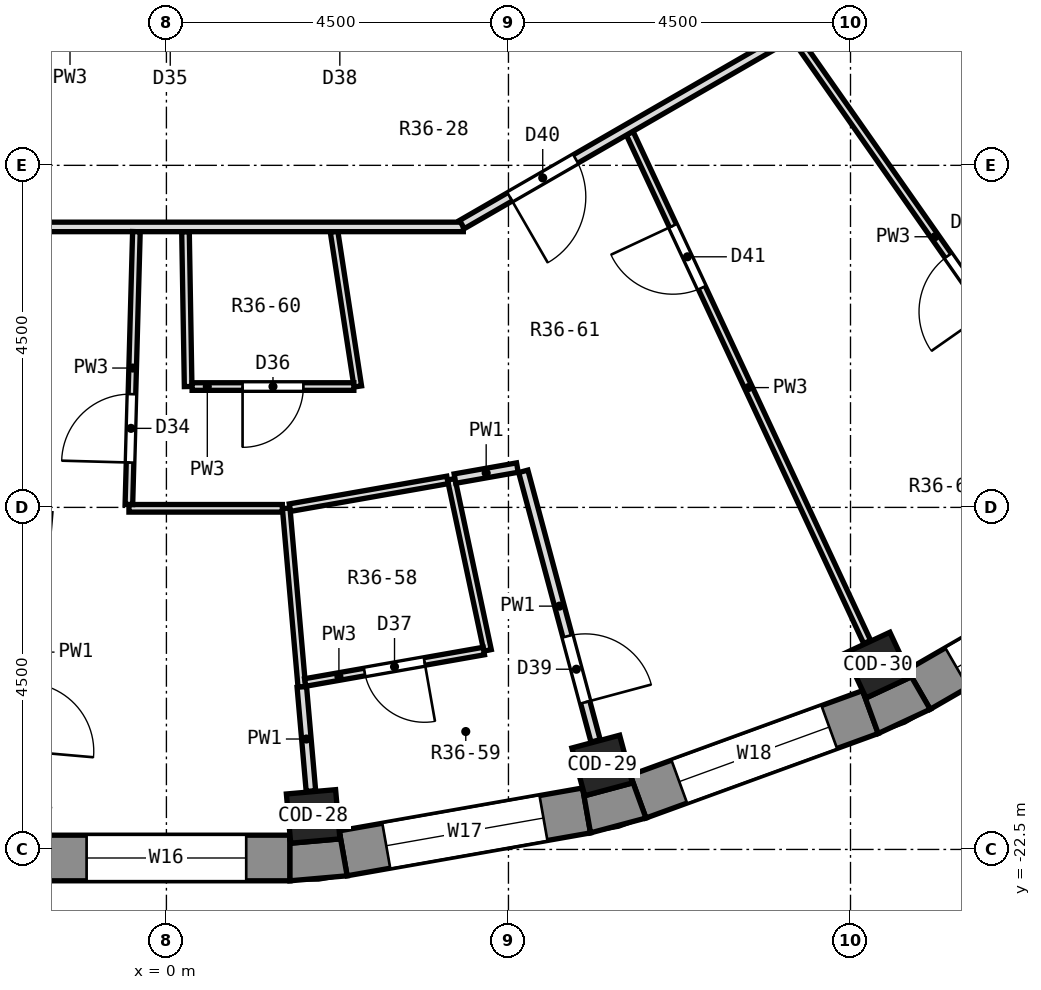
"""IFC4 building model, lengths in metres.
Left out: names, types, materials, properties, quantities, classifications, styles, units other than length and angle.
Written with IfcOpenShell. Run it as: python <this file> out.ifc"""

import sys

from ifc_helpers import new_model, si_unit, direction, frame, frame_2d, origin, origin_2d, place, context, subcontext, project, spatial, polyline, rectangle, outline, extrude, element, fill, save


model = new_model("IFC4")
c1 = context("Model", 3, precision=1e-05, world=origin(), true_north=direction((0.0, 1.0)))
c2 = subcontext(c1, "Body", "Model", "MODEL_VIEW")
j1 = project(units=[si_unit("LENGTHUNIT", "METRE"), si_unit("PLANEANGLEUNIT", "RADIAN")], contexts=[c1])
p1 = place(None, origin())
s1 = spatial("IfcSite", under=j1, at=p1, CompositionType="ELEMENT")
p2 = place(p1, origin())
s2 = spatial("IfcBuilding", under=s1, at=p2, CompositionType="ELEMENT")
p3 = place(p2, frame((0.0, 0.0, 259.4)))
s3 = spatial("IfcBuildingStorey", under=s2, at=p3, CompositionType="ELEMENT", Elevation=259.4)
for number, where, z_axis, x_axis in (
    (1, (1.93, -22.066, 0.0), (0.0, 0.0, 1.0), (0.087, -0.996, 0.0)),
    (2, (5.733, -21.395, 0.0), (0.0, 0.0, 1.0), (0.259, -0.966, 0.0)),
    (3, (9.361, -20.075, 0.0), (0.0, 0.0, 1.0), (0.423, -0.906, 0.0)),
):
    element("IfcColumn", number, at=place(p3, frame(where, z_axis=z_axis, x_axis=x_axis)), inside=s3, PredefinedType="COLUMN", context=c2, shape_type="SweptSolid", body=[
        extrude(rectangle(XDim=0.65, YDim=0.65, at=origin_2d()), origin(), (0.0, 0.0, 1.0), 3.3),
    ])
p4 = place(p3, frame((-1.626, -22.613, 0.0), z_axis=(0.0, 0.0, 1.0), x_axis=(1.0, 0.0, 0.0)))
e4 = element("IfcWall", 4, at=p4, inside=s3, PredefinedType="SOLIDWALL", context=c2, shape_type="SweptSolid", body=[
    extrude(rectangle(XDim=3.251, YDim=0.6, at=frame_2d((1.626, 0.0))), origin(), (0.0, 0.0, 1.0), 2.9),
])
p5 = place(p4, frame((0.576, 0.0, 0.9)))
e5 = element("IfcOpeningElement", 5, at=p5, cuts=e4, PredefinedType="OPENING", context=c2, shape_type="SweptSolid", body=[
    extrude(rectangle(XDim=2.1, YDim=1.8, at=frame_2d((1.05, 0.9))), frame((0.0, 0.312, 0.0), z_axis=(0.0, -1.0, 0.0), x_axis=(1.0, 0.0, 0.0)), (0.0, 0.0, 1.0), 0.624),
])
p6 = place(p3, frame((2.325, -22.551, 0.0), z_axis=(0.0, 0.0, 1.0), x_axis=(0.984806225186, 0.173656842178, 0.0)))
e6 = element("IfcWall", 6, at=p6, inside=s3, PredefinedType="SOLIDWALL", context=c2, shape_type="SweptSolid", body=[
    extrude(rectangle(XDim=3.252, YDim=0.6, at=frame_2d((1.626, 0.0))), origin(), (0.0, 0.0, 1.0), 2.9),
])
p7 = place(p6, frame((0.576, 0.0, 0.9)))
e7 = element("IfcOpeningElement", 7, at=p7, cuts=e6, PredefinedType="OPENING", context=c2, shape_type="SweptSolid", body=[
    extrude(rectangle(XDim=2.1, YDim=1.8, at=frame_2d((1.05, 0.9))), frame((0.0, 0.312, 0.0), z_axis=(0.0, -1.0, 0.0), x_axis=(1.0, 0.0, 0.0)), (0.0, 0.0, 1.0), 0.624),
])
p8 = place(p3, frame((6.206, -21.805, 0.0), z_axis=(0.0, 0.0, 1.0), x_axis=(0.939679383794, 0.342056509473, 0.0)))
e8 = element("IfcWall", 8, at=p8, inside=s3, PredefinedType="SOLIDWALL", context=c2, shape_type="SweptSolid", body=[
    extrude(rectangle(XDim=3.252, YDim=0.6, at=frame_2d((1.626, 0.0))), origin(), (0.0, 0.0, 1.0), 2.9),
])
p9 = place(p8, frame((0.576, 0.0, 0.9)))
e9 = element("IfcOpeningElement", 9, at=p9, cuts=e8, PredefinedType="OPENING", context=c2, shape_type="SweptSolid", body=[
    extrude(rectangle(XDim=2.1, YDim=1.8, at=frame_2d((1.05, 0.9))), frame((0.0, 0.312, 0.0), z_axis=(0.0, -1.0, 0.0), x_axis=(1.0, 0.0, 0.0)), (0.0, 0.0, 1.0), 0.624),
])
p10 = place(p3, frame((9.898, -20.396, 0.0), z_axis=(0.0, 0.0, 1.0), x_axis=(0.866016800201, 0.500014901547, 0.0)))
e10 = element("IfcWall", 10, at=p10, inside=s3, PredefinedType="SOLIDWALL", context=c2, shape_type="SweptSolid", body=[
    extrude(rectangle(XDim=3.252, YDim=0.6, at=frame_2d((1.626, 0.0))), origin(), (0.0, 0.0, 1.0), 2.9),
])
p11 = place(p10, frame((0.576, 0.0, 0.9)))
e11 = element("IfcOpeningElement", 11, at=p11, cuts=e10, PredefinedType="OPENING", context=c2, shape_type="SweptSolid", body=[
    extrude(rectangle(XDim=2.1, YDim=1.8, at=frame_2d((1.05, 0.9))), frame((0.0, 0.312, 0.0), z_axis=(0.0, -1.0, 0.0), x_axis=(1.0, 0.0, 0.0)), (0.0, 0.0, 1.0), 0.624),
])
p12 = place(p3, origin())
e12 = element("IfcWall", 12, at=p12, inside=s3, PredefinedType="SOLIDWALL", context=c2, shape_type="SweptSolid", body=[
    extrude(outline(polyline([(1.626, -22.913), (2.378, -22.847), (2.273, -22.256), (2.283, -22.361), (1.635, -22.418), (1.626, -22.312), (1.626, -22.913)])), origin(), (0.0, 0.0, 1.0), 2.9),
])
p13 = place(p3, origin())
e13 = element("IfcWall", 13, at=p13, inside=s3, PredefinedType="SOLIDWALL", context=c2, shape_type="SweptSolid", body=[
    extrude(outline(polyline([(6.309, -22.087), (6.104, -21.523), (6.131, -21.625), (5.503, -21.793), (5.476, -21.691), (5.58, -22.282), (6.309, -22.087)])), origin(), (0.0, 0.0, 1.0), 2.9),
])
p14 = place(p3, origin())
e14 = element("IfcWall", 14, at=p14, inside=s3, PredefinedType="SOLIDWALL", context=c2, shape_type="SweptSolid", body=[
    extrude(outline(polyline([(9.364, -20.975), (10.048, -20.656), (9.748, -20.136), (9.793, -20.232), (9.204, -20.507), (9.159, -20.411), (9.364, -20.975)])), origin(), (0.0, 0.0, 1.0), 2.9),
])
p15 = place(p3, frame((0.251, -14.373, 0.0), z_axis=(0.0, 0.0, 1.0), x_axis=(0.017133494207, -0.999853210915, 0.0)))
e15 = element("IfcWall", 15, at=p15, inside=s3, PredefinedType="PARTITIONING", context=c2, shape_type="SweptSolid", body=[
    extrude(rectangle(XDim=2.038, YDim=0.1, at=frame_2d((1.019, 0.0))), origin(), (0.0, 0.0, 1.0), 2.9),
])
p16 = place(p3, frame((1.576, -18.012, 0.0), z_axis=(0.0, 0.0, 1.0), x_axis=(0.087044975162, -0.996204382795, 0.0)))
e16 = element("IfcWall", 16, at=p16, inside=s3, PredefinedType="PARTITIONING", context=c2, shape_type="SweptSolid", body=[
    extrude(rectangle(XDim=2.359, YDim=0.1, at=frame_2d((1.179, 0.0))), origin(), (0.0, 0.0, 1.0), 2.9),
])
p17 = place(p3, frame((1.781, -20.362, 0.0), z_axis=(0.0, 0.0, 1.0), x_axis=(0.08715814214, -0.996194488169, 0.0)))
e17 = element("IfcWall", 17, at=p17, inside=s3, PredefinedType="PARTITIONING", context=c2, shape_type="SweptSolid", body=[
    extrude(rectangle(XDim=1.375, YDim=0.125, at=frame_2d((0.688, 0.0))), origin(), (0.0, 0.0, 1.0), 2.9),
])
p18 = place(p3, frame((2.206, -14.372, 0.0), z_axis=(0.0, 0.0, 1.0), x_axis=(0.151514148926, -0.988455088851, 0.0)))
e18 = element("IfcWall", 18, at=p18, inside=s3, PredefinedType="PARTITIONING", context=c2, shape_type="SweptSolid", body=[
    extrude(rectangle(XDim=2.061, YDim=0.1, at=frame_2d((1.03, 0.0))), origin(), (0.0, 0.0, 1.0), 2.9),
])
p19 = place(p3, frame((3.747, -17.63, 0.0), z_axis=(0.0, 0.0, 1.0), x_axis=(0.207710310325, -0.978190383813, 0.0)))
e19 = element("IfcWall", 19, at=p19, inside=s3, PredefinedType="PARTITIONING", context=c2, shape_type="SweptSolid", body=[
    extrude(rectangle(XDim=2.302, YDim=0.1, at=frame_2d((1.151, 0.0))), origin(), (0.0, 0.0, 1.0), 2.9),
])
p20 = place(p3, frame((4.695, -17.526, 0.0), z_axis=(0.0, 0.0, 1.0), x_axis=(0.259210267256, -0.965820913705, 0.0)))
e20 = element("IfcWall", 20, at=p20, inside=s3, PredefinedType="PARTITIONING", context=c2, shape_type="SweptSolid", body=[
    extrude(rectangle(XDim=3.671, YDim=0.125, at=frame_2d((1.836, 0.0))), origin(), (0.0, 0.0, 1.0), 2.9),
])
p21 = place(p20, frame((2.246, 0.0, 0.0)))
e21 = element("IfcOpeningElement", 21, at=p21, cuts=e20, PredefinedType="OPENING", context=c2, shape_type="SweptSolid", body=[
    extrude(rectangle(XDim=0.9, YDim=2.1, at=frame_2d((0.45, 1.05))), frame((0.0, 0.074, 0.0), z_axis=(0.0, -1.0, 0.0), x_axis=(1.0, 0.0, 0.0)), (0.0, 0.0, 1.0), 0.149),
])
p22 = place(p3, frame((6.095, -13.077, 0.0), z_axis=(0.0, 0.0, 1.0), x_axis=(0.422939739386, -0.906157810124, 0.0)))
e22 = element("IfcWall", 22, at=p22, inside=s3, PredefinedType="PARTITIONING", context=c2, shape_type="SweptSolid", body=[
    extrude(rectangle(XDim=7.388, YDim=0.1, at=frame_2d((3.694, 0.0))), origin(), (0.0, 0.0, 1.0), 2.9),
])
p23 = place(p22, frame((1.345, 0.0, 0.0)))
e23 = element("IfcOpeningElement", 23, at=p23, cuts=e22, PredefinedType="OPENING", context=c2, shape_type="SweptSolid", body=[
    extrude(rectangle(XDim=0.9, YDim=2.1, at=frame_2d((0.45, 1.05))), frame((0.0, 0.062, 0.0), z_axis=(0.0, -1.0, 0.0), x_axis=(1.0, 0.0, 0.0)), (0.0, 0.0, 1.0), 0.124),
])
p24 = place(p3, frame((8.275, -11.818, 0.0), z_axis=(0.0, 0.0, 1.0), x_axis=(0.573597629831, -0.819137204046, 0.0)))
e24 = element("IfcWall", 24, at=p24, inside=s3, PredefinedType="PARTITIONING", context=c2, shape_type="SweptSolid", body=[
    extrude(rectangle(XDim=7.388, YDim=0.1, at=frame_2d((3.694, 0.0))), origin(), (0.0, 0.0, 1.0), 2.9),
])
p25 = place(p24, frame((3.504, 0.0, 0.0)))
e25 = element("IfcOpeningElement", 25, at=p25, cuts=e24, PredefinedType="OPENING", context=c2, shape_type="SweptSolid", body=[
    extrude(rectangle(XDim=0.9, YDim=2.1, at=frame_2d((0.45, 1.05))), frame((0.0, 0.062, 0.0), z_axis=(0.0, -1.0, 0.0), x_axis=(1.0, 0.0, 0.0)), (0.0, 0.0, 1.0), 0.124),
])
p26 = place(p3, frame((10.477, -10.475, 0.0), z_axis=(0.0, 0.0, 1.0), x_axis=(0.707106781187, -0.707106781187, 0.0)))
e26 = element("IfcWall", 26, at=p26, inside=s3, PredefinedType="PARTITIONING", context=c2, shape_type="SweptSolid", body=[
    extrude(rectangle(XDim=3.848, YDim=0.125, at=frame_2d((1.924, 0.0))), origin(), (0.0, 0.0, 1.0), 2.9),
])
p27 = place(p3, frame((-0.493, -18.012, 0.0), z_axis=(0.0, 0.0, 1.0), x_axis=(1.0, 0.0, 0.0)))
e27 = element("IfcWall", 27, at=p27, inside=s3, PredefinedType="PARTITIONING", context=c2, shape_type="SweptSolid", body=[
    extrude(rectangle(XDim=2.018, YDim=0.1, at=frame_2d((1.009, 0.0))), origin(), (0.0, 0.0, 1.0), 2.9),
])
p28 = place(p3, frame((0.338, -16.41, 0.0), z_axis=(0.0, 0.0, 1.0), x_axis=(1.0, 0.0, 0.0)))
e28 = element("IfcWall", 28, at=p28, inside=s3, PredefinedType="PARTITIONING", context=c2, shape_type="SweptSolid", body=[
    extrude(rectangle(XDim=2.128, YDim=0.1, at=frame_2d((1.064, 0.0))), origin(), (0.0, 0.0, 1.0), 2.9),
])
p29 = place(p28, frame((0.664, 0.0, 0.0)))
e29 = element("IfcOpeningElement", 29, at=p29, cuts=e28, PredefinedType="OPENING", context=c2, shape_type="SweptSolid", body=[
    extrude(rectangle(XDim=0.8, YDim=2.1, at=frame_2d((0.4, 1.05))), frame((0.0, 0.062, 0.0), z_axis=(0.0, -1.0, 0.0), x_axis=(1.0, 0.0, 0.0)), (0.0, 0.0, 1.0), 0.124),
])
p30 = place(p3, frame((-3.771, -14.31, 0.0), z_axis=(0.0, 0.0, 1.0), x_axis=(1.0, 0.0, 0.0)))
e30 = element("IfcWall", 30, at=p30, inside=s3, PredefinedType="PARTITIONING", context=c2, shape_type="SweptSolid", body=[
    extrude(rectangle(XDim=7.677, YDim=0.125, at=frame_2d((3.838, 0.0))), origin(), (0.0, 0.0, 1.0), 2.9),
])
p31 = place(p3, frame((1.826, -20.303, 0.0), z_axis=(0.0, 0.0, 1.0), x_axis=(0.984856623516, 0.173370790838, 0.0)))
e31 = element("IfcWall", 31, at=p31, inside=s3, PredefinedType="PARTITIONING", context=c2, shape_type="SweptSolid", body=[
    extrude(rectangle(XDim=2.385, YDim=0.1, at=frame_2d((1.193, 0.0))), origin(), (0.0, 0.0, 1.0), 2.9),
])
p32 = place(p31, frame((0.793, 0.0, 0.0)))
e32 = element("IfcOpeningElement", 32, at=p32, cuts=e31, PredefinedType="OPENING", context=c2, shape_type="SweptSolid", body=[
    extrude(rectangle(XDim=0.8, YDim=2.1, at=frame_2d((0.4, 1.05))), frame((0.0, 0.062, 0.0), z_axis=(0.0, -1.0, 0.0), x_axis=(1.0, 0.0, 0.0)), (0.0, 0.0, 1.0), 0.124),
])
p33 = place(p3, frame((1.625, -18.003, 0.0), z_axis=(0.0, 0.0, 1.0), x_axis=(0.984864041574, 0.173328646261, 0.0)))
e33 = element("IfcWall", 33, at=p33, inside=s3, PredefinedType="PARTITIONING", context=c2, shape_type="SweptSolid", body=[
    extrude(rectangle(XDim=2.104, YDim=0.1, at=frame_2d((1.052, 0.0))), origin(), (0.0, 0.0, 1.0), 2.9),
])
p34 = place(p3, frame((3.796, -17.621, 0.0), z_axis=(0.0, 0.0, 1.0), x_axis=(0.984715706085, 0.174169395101, 0.0)))
e34 = element("IfcWall", 34, at=p34, inside=s3, PredefinedType="PARTITIONING", context=c2, shape_type="SweptSolid", body=[
    extrude(rectangle(XDim=0.834, YDim=0.125, at=frame_2d((0.417, 0.0))), origin(), (0.0, 0.0, 1.0), 2.9),
])
p35 = place(p3, frame((3.888, -14.279, 0.0), z_axis=(0.0, 0.0, 1.0), x_axis=(0.866068111199, 0.499926021291, 0.0)))
e35 = element("IfcWall", 35, at=p35, inside=s3, PredefinedType="PARTITIONING", context=c2, shape_type="SweptSolid", body=[
    extrude(rectangle(XDim=7.544, YDim=0.125, at=frame_2d((3.772, 0.0))), origin(), (0.0, 0.0, 1.0), 2.9),
])
p36 = place(p35, frame((0.727, 0.0, 0.0)))
e36 = element("IfcOpeningElement", 36, at=p36, cuts=e35, PredefinedType="OPENING", context=c2, shape_type="SweptSolid", body=[
    extrude(rectangle(XDim=1.0, YDim=2.1, at=frame_2d((0.5, 1.05))), frame((0.0, 0.074, 0.0), z_axis=(0.0, -1.0, 0.0), x_axis=(1.0, 0.0, 0.0)), (0.0, 0.0, 1.0), 0.149),
])
p37 = place(p3, frame((-0.494, -17.961, 0.0), z_axis=(0.0, 0.0, 1.0), x_axis=(0.027544314619, 0.999620583388, 0.0)))
e37 = element("IfcWall", 37, at=p37, inside=s3, PredefinedType="PARTITIONING", context=c2, shape_type="SweptSolid", body=[
    extrude(rectangle(XDim=3.59, YDim=0.1, at=frame_2d((1.795, 0.0))), origin(), (0.0, 0.0, 1.0), 2.9),
])
p38 = place(p37, frame((0.551, 0.0, 0.0)))
e38 = element("IfcOpeningElement", 38, at=p38, cuts=e37, PredefinedType="OPENING", context=c2, shape_type="SweptSolid", body=[
    extrude(rectangle(XDim=0.9, YDim=2.1, at=frame_2d((0.45, 1.05))), frame((0.0, 0.062, 0.0), z_axis=(0.0, -1.0, 0.0), x_axis=(1.0, 0.0, 0.0)), (0.0, 0.0, 1.0), 0.124),
])
p39 = place(p5, origin())
e39 = element("IfcWindow", 39, at=p39, inside=s3, PartitioningType="SINGLE_PANEL", PredefinedType="WINDOW", context=c2, shape_type="SweptSolid", body=[
    extrude(rectangle(XDim=2.1, YDim=1.8, at=frame_2d((1.05, 0.9))), frame((0.0, 0.18, 0.0), z_axis=(0.0, -1.0, 0.0), x_axis=(1.0, 0.0, 0.0)), (0.0, 0.0, 1.0), 0.06),
])
fill(e5, e39)
p40 = place(p7, origin())
e40 = element("IfcWindow", 40, at=p40, inside=s3, PartitioningType="SINGLE_PANEL", PredefinedType="WINDOW", context=c2, shape_type="SweptSolid", body=[
    extrude(rectangle(XDim=2.1, YDim=1.8, at=frame_2d((1.05, 0.9))), frame((0.0, 0.18, 0.0), z_axis=(0.0, -1.0, 0.0), x_axis=(1.0, 0.0, 0.0)), (0.0, 0.0, 1.0), 0.06),
])
fill(e7, e40)
p41 = place(p9, origin())
e41 = element("IfcWindow", 41, at=p41, inside=s3, PartitioningType="SINGLE_PANEL", PredefinedType="WINDOW", context=c2, shape_type="SweptSolid", body=[
    extrude(rectangle(XDim=2.1, YDim=1.8, at=frame_2d((1.05, 0.9))), frame((0.0, 0.18, 0.0), z_axis=(0.0, -1.0, 0.0), x_axis=(1.0, 0.0, 0.0)), (0.0, 0.0, 1.0), 0.06),
])
fill(e9, e41)
p42 = place(p11, origin())
e42 = element("IfcWindow", 42, at=p42, inside=s3, PartitioningType="SINGLE_PANEL", PredefinedType="WINDOW", context=c2, shape_type="SweptSolid", body=[
    extrude(rectangle(XDim=2.1, YDim=1.8, at=frame_2d((1.05, 0.9))), frame((0.0, 0.18, 0.0), z_axis=(0.0, -1.0, 0.0), x_axis=(1.0, 0.0, 0.0)), (0.0, 0.0, 1.0), 0.06),
])
fill(e11, e42)
p43 = place(p38, origin())
e43 = element("IfcDoor", 43, at=p43, inside=s3, OperationType="SINGLE_SWING_LEFT", PredefinedType="DOOR", context=c2, shape_type="SweptSolid", body=[
    extrude(rectangle(XDim=0.9, YDim=2.1, at=frame_2d((0.45, 1.05))), frame((0.0, 0.025, 0.0), z_axis=(0.0, -1.0, 0.0), x_axis=(1.0, 0.0, 0.0)), (0.0, 0.0, 1.0), 0.05),
])
fill(e38, e43)
p44 = place(p29, frame((0.8, 0.0, 0.0), z_axis=(0.0, 0.0, 1.0), x_axis=(-1.0, 0.0, 0.0)))
e44 = element("IfcDoor", 44, at=p44, inside=s3, OperationType="SINGLE_SWING_RIGHT", PredefinedType="DOOR", context=c2, shape_type="SweptSolid", body=[
    extrude(rectangle(XDim=0.8, YDim=2.1, at=frame_2d((0.4, 1.05))), frame((0.0, 0.025, 0.0), z_axis=(0.0, -1.0, 0.0), x_axis=(1.0, 0.0, 0.0)), (0.0, 0.0, 1.0), 0.05),
])
fill(e29, e44)
p45 = place(p32, frame((0.8, 0.0, 0.0), z_axis=(0.0, 0.0, 1.0), x_axis=(-1.0, 0.0, 0.0)))
e45 = element("IfcDoor", 45, at=p45, inside=s3, OperationType="SINGLE_SWING_LEFT", PredefinedType="DOOR", context=c2, shape_type="SweptSolid", body=[
    extrude(rectangle(XDim=0.8, YDim=2.1, at=frame_2d((0.4, 1.05))), frame((0.0, 0.025, 0.0), z_axis=(0.0, -1.0, 0.0), x_axis=(1.0, 0.0, 0.0)), (0.0, 0.0, 1.0), 0.05),
])
fill(e32, e45)
p46 = place(p21, origin())
e46 = element("IfcDoor", 46, at=p46, inside=s3, OperationType="SINGLE_SWING_RIGHT", PredefinedType="DOOR", context=c2, shape_type="SweptSolid", body=[
    extrude(rectangle(XDim=0.9, YDim=2.1, at=frame_2d((0.45, 1.05))), frame((0.0, 0.025, 0.0), z_axis=(0.0, -1.0, 0.0), x_axis=(1.0, 0.0, 0.0)), (0.0, 0.0, 1.0), 0.05),
])
fill(e21, e46)
p47 = place(p36, frame((1.0, 0.0, 0.0), z_axis=(0.0, 0.0, 1.0), x_axis=(-1.0, 0.0, 0.0)))
e47 = element("IfcDoor", 47, at=p47, inside=s3, OperationType="SINGLE_SWING_RIGHT", PredefinedType="DOOR", context=c2, shape_type="SweptSolid", body=[
    extrude(rectangle(XDim=1.0, YDim=2.1, at=frame_2d((0.5, 1.05))), frame((0.0, 0.025, 0.0), z_axis=(0.0, -1.0, 0.0), x_axis=(1.0, 0.0, 0.0)), (0.0, 0.0, 1.0), 0.05),
])
fill(e36, e47)
p48 = place(p23, frame((0.9, 0.0, 0.0), z_axis=(0.0, 0.0, 1.0), x_axis=(-1.0, 0.0, 0.0)))
e48 = element("IfcDoor", 48, at=p48, inside=s3, OperationType="SINGLE_SWING_RIGHT", PredefinedType="DOOR", context=c2, shape_type="SweptSolid", body=[
    extrude(rectangle(XDim=0.9, YDim=2.1, at=frame_2d((0.45, 1.05))), frame((0.0, 0.025, 0.0), z_axis=(0.0, -1.0, 0.0), x_axis=(1.0, 0.0, 0.0)), (0.0, 0.0, 1.0), 0.05),
])
fill(e23, e48)
p49 = place(p25, frame((0.9, 0.0, 0.0), z_axis=(0.0, 0.0, 1.0), x_axis=(-1.0, 0.0, 0.0)))
e49 = element("IfcDoor", 49, at=p49, inside=s3, OperationType="SINGLE_SWING_LEFT", PredefinedType="DOOR", context=c2, shape_type="SweptSolid", body=[
    extrude(rectangle(XDim=0.9, YDim=2.1, at=frame_2d((0.45, 1.05))), frame((0.0, 0.025, 0.0), z_axis=(0.0, -1.0, 0.0), x_axis=(1.0, 0.0, 0.0)), (0.0, 0.0, 1.0), 0.05),
])
fill(e25, e49)
save(model, sys.argv[1])
